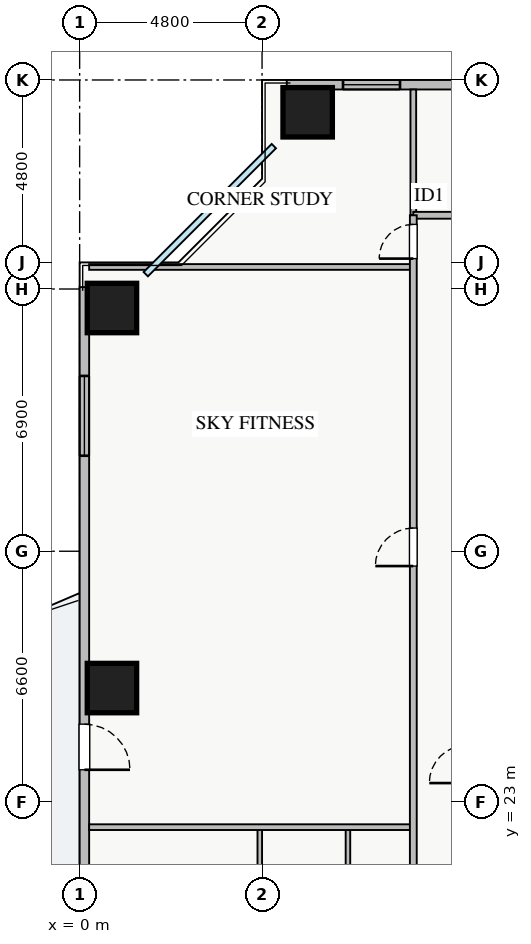
"""IFC4 building model, lengths in metres.
Left out: names, types, materials, properties, quantities, classifications, styles, units other than length and angle.
Written with IfcOpenShell. Run it as: python <this file> out.ifc"""

import sys

from ifc_helpers import new_model, si_unit, direction, frame, frame_2d, origin, origin_2d, place, context, subcontext, project, spatial, rectangle, extrude, source, transform, mapped, element, fill, save


model = new_model("IFC4")
c1 = context("Model", 3, precision=1e-05, world=origin(), true_north=direction((0.0, 1.0)))
c2 = subcontext(c1, "Body", "Model", "MODEL_VIEW")
j1 = project(units=[si_unit("LENGTHUNIT", "METRE"), si_unit("PLANEANGLEUNIT", "RADIAN")], contexts=[c1])
p1 = place(None, origin())
s1 = spatial("IfcSite", under=j1, at=p1, CompositionType="ELEMENT")
p2 = place(p1, origin())
s2 = spatial("IfcBuilding", under=s1, at=p2, CompositionType="ELEMENT")
p3 = place(p2, frame((0.0, 0.0, 29.5)))
s3 = spatial("IfcBuildingStorey", under=s2, at=p3, CompositionType="ELEMENT", Elevation=29.5)
m1 = source(origin(), c2, "Body", "SweptSolid", [
    extrude(rectangle(XDim=1.3, YDim=1.3, at=origin_2d()), origin(), (0.0, 0.0, 1.0), 3.25),
])
for number, where, z_axis, x_axis in (
    (1, (6.0, 41.15, 0.0), (0.0, 0.0, 1.0), (1.0, 0.0, 0.0)),
    (2, (0.85, 36.0, 0.0), (0.0, 0.0, 1.0), (1.0, 0.0, 0.0)),
    (3, (0.85, 26.0, 0.0), (0.0, 0.0, 1.0), (1.0, 0.0, 0.0)),
):
    element("IfcColumn", number, at=place(p3, frame(where, z_axis=z_axis, x_axis=x_axis)), inside=s3, PredefinedType="COLUMN", context=c2, shape_type="MappedRepresentation", body=[
        mapped(m1, transform((0.0, 0.0, 0.0), x_axis=(1.0, 0.0, 0.0), y_axis=(0.0, 1.0, 0.0), z_axis=(0.0, 0.0, 1.0), scale=1.0)),
    ])
p4 = place(p3, frame((5.45, 41.875, 0.0), z_axis=(0.0, 0.0, 1.0), x_axis=(1.0, 0.0, 0.0)))
e4 = element("IfcWall", 4, at=p4, inside=s3, PredefinedType="STANDARD", context=c2, shape_type="SweptSolid", body=[
    extrude(rectangle(XDim=27.1, YDim=0.25, at=frame_2d((13.55, 0.0))), origin(), (0.0, 0.0, 1.0), 2.61),
])
p5 = place(p4, frame((14.4, 0.0, 0.0)))
e5 = element("IfcOpeningElement", 5, at=p5, cuts=e4, PredefinedType="OPENING", context=c2, shape_type="SweptSolid", body=[
    extrude(rectangle(XDim=1.2, YDim=2.1, at=frame_2d((0.6, 1.05))), frame((0.0, 0.135, 0.0), z_axis=(0.0, -1.0, 0.0), x_axis=(1.0, 0.0, 0.0)), (0.0, 0.0, 1.0), 0.27),
])
p6 = place(p4, frame((1.48, 0.0, 0.9)))
e6 = element("IfcOpeningElement", 6, at=p6, cuts=e4, PredefinedType="OPENING", context=c2, shape_type="SweptSolid", body=[
    extrude(rectangle(XDim=1.5, YDim=1.5, at=frame_2d((0.75, 0.75))), frame((0.0, 0.135, 0.0), z_axis=(0.0, -1.0, 0.0), x_axis=(1.0, 0.0, 0.0)), (0.0, 0.0, 1.0), 0.27),
])
p7 = place(p4, frame((9.263, 0.0, 0.9)))
e7 = element("IfcOpeningElement", 7, at=p7, cuts=e4, PredefinedType="OPENING", context=c2, shape_type="SweptSolid", body=[
    extrude(rectangle(XDim=1.8, YDim=1.45, at=frame_2d((0.9, 0.725))), frame((0.0, 0.135, 0.0), z_axis=(0.0, -1.0, 0.0), x_axis=(1.0, 0.0, 0.0)), (0.0, 0.0, 1.0), 0.27),
])
p8 = place(p4, frame((16.188, 0.0, 0.9)))
e8 = element("IfcOpeningElement", 8, at=p8, cuts=e4, PredefinedType="OPENING", context=c2, shape_type="SweptSolid", body=[
    extrude(rectangle(XDim=1.5, YDim=1.45, at=frame_2d((0.75, 0.725))), frame((0.0, 0.135, 0.0), z_axis=(0.0, -1.0, 0.0), x_axis=(1.0, 0.0, 0.0)), (0.0, 0.0, 1.0), 0.27),
])
p9 = place(p4, frame((22.663, 0.0, 0.9)))
e9 = element("IfcOpeningElement", 9, at=p9, cuts=e4, PredefinedType="OPENING", context=c2, shape_type="SweptSolid", body=[
    extrude(rectangle(XDim=2.1, YDim=1.48, at=frame_2d((1.05, 0.74))), frame((0.0, 0.135, 0.0), z_axis=(0.0, -1.0, 0.0), x_axis=(1.0, 0.0, 0.0)), (0.0, 0.0, 1.0), 0.27),
])
p10 = place(p4, frame((5.114, 0.0, 0.9)))
e10 = element("IfcOpeningElement", 10, at=p10, cuts=e4, PredefinedType="OPENING", context=c2, shape_type="SweptSolid", body=[
    extrude(rectangle(XDim=2.4, YDim=1.5, at=frame_2d((1.2, 0.75))), frame((0.0, 0.135, 0.0), z_axis=(0.0, -1.0, 0.0), x_axis=(1.0, 0.0, 0.0)), (0.0, 0.0, 1.0), 0.27),
])
p11 = place(p3, frame((0.125, 9.45, 0.0), z_axis=(0.0, 0.0, 1.0), x_axis=(0.0, 1.0, 0.0)))
e11 = element("IfcWall", 11, at=p11, inside=s3, PredefinedType="STANDARD", context=c2, shape_type="SweptSolid", body=[
    extrude(rectangle(XDim=27.1, YDim=0.25, at=frame_2d((13.55, 0.0))), origin(), (0.0, 0.0, 1.0), 2.61),
])
p12 = place(p11, frame((14.4, 0.0, 0.0)))
e12 = element("IfcOpeningElement", 12, at=p12, cuts=e11, PredefinedType="OPENING", context=c2, shape_type="SweptSolid", body=[
    extrude(rectangle(XDim=1.2, YDim=2.1, at=frame_2d((0.6, 1.05))), frame((0.0, 0.135, 0.0), z_axis=(0.0, -1.0, 0.0), x_axis=(1.0, 0.0, 0.0)), (0.0, 0.0, 1.0), 0.27),
])
p13 = place(p11, frame((2.188, 0.0, 0.9)))
e13 = element("IfcOpeningElement", 13, at=p13, cuts=e11, PredefinedType="OPENING", context=c2, shape_type="SweptSolid", body=[
    extrude(rectangle(XDim=2.4, YDim=1.48, at=frame_2d((1.2, 0.74))), frame((0.0, 0.135, 0.0), z_axis=(0.0, -1.0, 0.0), x_axis=(1.0, 0.0, 0.0)), (0.0, 0.0, 1.0), 0.27),
])
p14 = place(p11, frame((22.663, 0.0, 0.9)))
e14 = element("IfcOpeningElement", 14, at=p14, cuts=e11, PredefinedType="OPENING", context=c2, shape_type="SweptSolid", body=[
    extrude(rectangle(XDim=2.1, YDim=1.48, at=frame_2d((1.05, 0.74))), frame((0.0, 0.135, 0.0), z_axis=(0.0, -1.0, 0.0), x_axis=(1.0, 0.0, 0.0)), (0.0, 0.0, 1.0), 0.27),
])
p15 = place(p11, frame((5.95, 0.0, 0.9)))
e15 = element("IfcOpeningElement", 15, at=p15, cuts=e11, PredefinedType="OPENING", context=c2, shape_type="SweptSolid", body=[
    extrude(rectangle(XDim=0.9, YDim=1.2, at=frame_2d((0.45, 0.6))), frame((0.0, 0.135, 0.0), z_axis=(0.0, -1.0, 0.0), x_axis=(1.0, 0.0, 0.0)), (0.0, 0.0, 1.0), 0.27),
])
p16 = place(p3, frame((8.78, 38.44, 0.0), z_axis=(0.0, 0.0, 1.0), x_axis=(0.0, 1.0, 0.0)))
e16 = element("IfcWall", 16, at=p16, inside=s3, PredefinedType="PARTITIONING", context=c2, shape_type="SweptSolid", body=[
    extrude(rectangle(XDim=3.31, YDim=0.15, at=frame_2d((1.655, 0.0))), origin(), (0.0, 0.0, 1.0), 3.07),
])
p17 = place(p3, frame((8.78, 38.44, 0.0), z_axis=(0.0, 0.0, 1.0), x_axis=(1.0, 0.0, 0.0)))
e17 = element("IfcWall", 17, at=p17, inside=s3, PredefinedType="PARTITIONING", context=c2, shape_type="SweptSolid", body=[
    extrude(rectangle(XDim=23.54, YDim=0.18, at=frame_2d((11.77, 0.0))), origin(), (0.0, 0.0, 1.0), 3.07),
])
p18 = place(p17, frame((4.66, 0.0, 0.0)))
e18 = element("IfcOpeningElement", 18, at=p18, cuts=e17, PredefinedType="OPENING", context=c2, shape_type="SweptSolid", body=[
    extrude(rectangle(XDim=1.0, YDim=2.05, at=frame_2d((0.5, 1.025))), frame((0.0, 0.1, 0.0), z_axis=(0.0, -1.0, 0.0), x_axis=(1.0, 0.0, 0.0)), (0.0, 0.0, 1.0), 0.2),
])
p19 = place(p17, frame((16.43, 0.0, 0.0)))
e19 = element("IfcOpeningElement", 19, at=p19, cuts=e17, PredefinedType="OPENING", context=c2, shape_type="SweptSolid", body=[
    extrude(rectangle(XDim=1.0, YDim=2.05, at=frame_2d((0.5, 1.025))), frame((0.0, 0.1, 0.0), z_axis=(0.0, -1.0, 0.0), x_axis=(1.0, 0.0, 0.0)), (0.0, 0.0, 1.0), 0.2),
])
p20 = place(p3, frame((0.25, 37.08, 0.0), z_axis=(0.0, 0.0, 1.0), x_axis=(1.0, 0.0, 0.0)))
e20 = element("IfcWall", 20, at=p20, inside=s3, PredefinedType="PARTITIONING", context=c2, shape_type="SweptSolid", body=[
    extrude(rectangle(XDim=8.53, YDim=0.15, at=frame_2d((4.265, 0.0))), origin(), (0.0, 0.0, 1.0), 3.07),
])
for number, where, z_axis, x_axis in (
    (21, (4.74, 15.18, 0.0), (0.0, 0.0, 1.0), (0.0, 1.0, 0.0)),
    (22, (7.06, 15.18, 0.0), (0.0, 0.0, 1.0), (0.0, 1.0, 0.0)),
):
    element("IfcWall", number, at=place(p3, frame(where, z_axis=z_axis, x_axis=x_axis)), inside=s3, PredefinedType="PLUMBINGWALL", context=c2, shape_type="SweptSolid", body=[
        extrude(rectangle(XDim=7.16, YDim=0.12, at=frame_2d((3.58, 0.0))), origin(), (0.0, 0.0, 1.0), 3.07),
    ])
p21 = place(p3, frame((0.25, 22.34, 0.0), z_axis=(0.0, 0.0, 1.0), x_axis=(1.0, 0.0, 0.0)))
e23 = element("IfcWall", 23, at=p21, inside=s3, PredefinedType="PARTITIONING", context=c2, shape_type="SweptSolid", body=[
    extrude(rectangle(XDim=8.53, YDim=0.15, at=frame_2d((4.265, 0.0))), origin(), (0.0, 0.0, 1.0), 3.07),
])
p22 = place(p3, frame((8.78, 7.21, 0.0), z_axis=(0.0, 0.0, 1.0), x_axis=(0.0, 1.0, 0.0)))
e24 = element("IfcWall", 24, at=p22, inside=s3, PredefinedType="PARTITIONING", context=c2, shape_type="SweptSolid", body=[
    extrude(rectangle(XDim=31.23, YDim=0.18, at=frame_2d((15.615, 0.0))), origin(), (0.0, 0.0, 1.0), 3.07),
])
p23 = place(p22, frame((30.09, 0.0, 0.0)))
e25 = element("IfcOpeningElement", 25, at=p23, cuts=e24, PredefinedType="OPENING", context=c2, shape_type="SweptSolid", body=[
    extrude(rectangle(XDim=0.9, YDim=2.05, at=frame_2d((0.45, 1.025))), frame((0.0, 0.1, 0.0), z_axis=(0.0, -1.0, 0.0), x_axis=(1.0, 0.0, 0.0)), (0.0, 0.0, 1.0), 0.2),
])
p24 = place(p22, frame((0.24, 0.0, 0.0)))
e26 = element("IfcOpeningElement", 26, at=p24, cuts=e24, PredefinedType="OPENING", context=c2, shape_type="SweptSolid", body=[
    extrude(rectangle(XDim=0.9, YDim=2.05, at=frame_2d((0.45, 1.025))), frame((0.0, 0.1, 0.0), z_axis=(0.0, -1.0, 0.0), x_axis=(1.0, 0.0, 0.0)), (0.0, 0.0, 1.0), 0.2),
])
p25 = place(p22, frame((3.975, 0.0, 0.0)))
e27 = element("IfcOpeningElement", 27, at=p25, cuts=e24, PredefinedType="OPENING", context=c2, shape_type="SweptSolid", body=[
    extrude(rectangle(XDim=1.0, YDim=2.05, at=frame_2d((0.5, 1.025))), frame((0.0, 0.1, 0.0), z_axis=(0.0, -1.0, 0.0), x_axis=(1.0, 0.0, 0.0)), (0.0, 0.0, 1.0), 0.2),
])
p26 = place(p22, frame((22.0, 0.0, 0.0)))
e28 = element("IfcOpeningElement", 28, at=p26, cuts=e24, PredefinedType="OPENING", context=c2, shape_type="SweptSolid", body=[
    extrude(rectangle(XDim=1.0, YDim=2.05, at=frame_2d((0.5, 1.025))), frame((0.0, 0.1, 0.0), z_axis=(0.0, -1.0, 0.0), x_axis=(1.0, 0.0, 0.0)), (0.0, 0.0, 1.0), 0.2),
])
m2 = source(origin(), c2, "Body", "SweptSolid", [
    extrude(rectangle(XDim=1.5, YDim=1.5, at=frame_2d((0.75, 0.75))), frame((0.0, 0.03, 0.0), z_axis=(0.0, -1.0, 0.0), x_axis=(1.0, 0.0, 0.0)), (0.0, 0.0, 1.0), 0.06),
])
p27 = place(p6, origin())
e29 = element("IfcWindow", 29, at=p27, inside=s3, PartitioningType="TRIPLE_PANEL_VERTICAL", PredefinedType="WINDOW", context=c2, shape_type="MappedRepresentation", body=[
    mapped(m2, transform((0.0, 0.0, 0.0), x_axis=(1.0, 0.0, 0.0), y_axis=(0.0, 1.0, 0.0), z_axis=(0.0, 0.0, 1.0), scale=1.0)),
])
fill(e6, e29)
m3 = source(origin(), c2, "Body", "SweptSolid", [
    extrude(rectangle(XDim=1.2, YDim=2.1, at=frame_2d((0.6, 1.05))), frame((0.0, 0.025, 0.0), z_axis=(0.0, -1.0, 0.0), x_axis=(1.0, 0.0, 0.0)), (0.0, 0.0, 1.0), 0.05),
])
p28 = place(p12, frame((1.2, 0.0, 0.0), z_axis=(0.0, 0.0, 1.0), x_axis=(-1.0, 0.0, 0.0)))
e30 = element("IfcDoor", 30, at=p28, inside=s3, OperationType="SINGLE_SWING_LEFT", PredefinedType="DOOR", context=c2, shape_type="MappedRepresentation", body=[
    mapped(m3, transform((0.0, 0.0, 0.0), x_axis=(1.0, 0.0, 0.0), y_axis=(0.0, 1.0, 0.0), z_axis=(0.0, 0.0, 1.0), scale=1.0)),
])
fill(e12, e30)
m4 = source(origin(), c2, "Body", "SweptSolid", [
    extrude(rectangle(XDim=2.1, YDim=1.48, at=frame_2d((1.05, 0.74))), frame((0.0, 0.03, 0.0), z_axis=(0.0, -1.0, 0.0), x_axis=(1.0, 0.0, 0.0)), (0.0, 0.0, 1.0), 0.06),
])
p29 = place(p14, origin())
e31 = element("IfcWindow", 31, at=p29, inside=s3, PartitioningType="TRIPLE_PANEL_VERTICAL", PredefinedType="WINDOW", context=c2, shape_type="MappedRepresentation", body=[
    mapped(m4, transform((0.0, 0.0, 0.0), x_axis=(1.0, 0.0, 0.0), y_axis=(0.0, 1.0, 0.0), z_axis=(0.0, 0.0, 1.0), scale=1.0)),
])
fill(e14, e31)
m5 = source(origin(), c2, "Body", "SweptSolid", [
    extrude(rectangle(XDim=0.9, YDim=2.05, at=frame_2d((0.45, 1.025))), frame((0.0, 0.025, 0.0), z_axis=(0.0, -1.0, 0.0), x_axis=(1.0, 0.0, 0.0)), (0.0, 0.0, 1.0), 0.05),
])
p30 = place(p23, origin())
e32 = element("IfcDoor", 32, at=p30, inside=s3, OperationType="SINGLE_SWING_LEFT", PredefinedType="DOOR", context=c2, shape_type="MappedRepresentation", body=[
    mapped(m5, transform((0.0, 0.0, 0.0), x_axis=(1.0, 0.0, 0.0), y_axis=(0.0, 1.0, 0.0), z_axis=(0.0, 0.0, 1.0), scale=1.0)),
])
fill(e25, e32)
m6 = source(origin(), c2, "Body", "SweptSolid", [
    extrude(rectangle(XDim=1.0, YDim=2.05, at=frame_2d((0.5, 1.025))), frame((0.0, 0.025, 0.0), z_axis=(0.0, -1.0, 0.0), x_axis=(1.0, 0.0, 0.0)), (0.0, 0.0, 1.0), 0.05),
])
p31 = place(p26, origin())
e33 = element("IfcDoor", 33, at=p31, inside=s3, OperationType="SINGLE_SWING_LEFT", PredefinedType="DOOR", context=c2, shape_type="MappedRepresentation", body=[
    mapped(m6, transform((0.0, 0.0, 0.0), x_axis=(1.0, 0.0, 0.0), y_axis=(0.0, 1.0, 0.0), z_axis=(0.0, 0.0, 1.0), scale=1.0)),
])
fill(e28, e33)
save(model, sys.argv[1])
